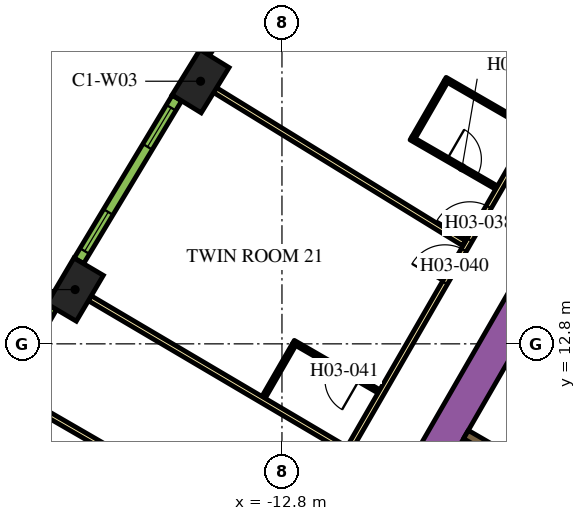
"""IFC4 building model, lengths in metres.
Left out: names, types, materials, properties, quantities, classifications, styles, units other than length and angle.
Written with IfcOpenShell. Run it as: python <this file> out.ifc"""

import sys

from ifc_helpers import new_model, si_unit, direction, frame, frame_2d, origin, origin_2d, place, context, subcontext, project, spatial, rectangle, extrude, element, fill, save


model = new_model("IFC4")
c1 = context("Model", 3, precision=1e-05, world=origin(), true_north=direction((0.0, 1.0)))
c2 = subcontext(c1, "Body", "Model", "MODEL_VIEW")
j1 = project(units=[si_unit("LENGTHUNIT", "METRE"), si_unit("PLANEANGLEUNIT", "RADIAN")], contexts=[c1])
p1 = place(None, origin())
s1 = spatial("IfcSite", under=j1, at=p1, CompositionType="ELEMENT")
p2 = place(p1, origin())
s2 = spatial("IfcBuilding", under=s1, at=p2, CompositionType="ELEMENT")
p3 = place(p2, frame((0.0, 0.0, 58.8)))
s3 = spatial("IfcBuildingStorey", under=s2, at=p3, CompositionType="ELEMENT", Elevation=58.8)
for number, where, z_axis, x_axis in (
    (1, (-14.942, 19.71, 0.0), (0.0, 0.0, 1.0), (-0.524, -0.852, 0.0)),
    (2, (-18.243, 14.228, 0.0), (0.0, 0.0, 1.0), (-0.508, -0.861, 0.0)),
):
    element("IfcColumn", number, at=place(p3, frame(where, z_axis=z_axis, x_axis=x_axis)), inside=s3, PredefinedType="COLUMN", context=c2, shape_type="SweptSolid", body=[
        extrude(rectangle(XDim=1.4, YDim=0.9, at=origin_2d()), origin(), (0.0, 0.0, 1.0), 3.9),
    ])
p4 = place(p3, frame((-14.268, 0.387, 0.0), z_axis=(0.0, 0.0, 1.0), x_axis=(0.499994617707, 0.866028511231, 0.0)))
e3 = element("IfcWall", 3, at=p4, inside=s3, PredefinedType="SOLIDWALL", context=c2, shape_type="SweptSolid", body=[
    extrude(rectangle(XDim=18.817, YDim=0.9, at=frame_2d((9.409, 0.0))), origin(), (0.0, 0.0, 1.0), 3.9),
])
p5 = place(p3, frame((-7.959, 10.415, 0.0), z_axis=(0.0, 0.0, 1.0), x_axis=(0.866020958405, -0.500007699544, 0.0)))
e4 = element("IfcWall", 4, at=p5, inside=s3, PredefinedType="SOLIDWALL", context=c2, shape_type="SweptSolid", body=[
    extrude(rectangle(XDim=4.1, YDim=0.25, at=frame_2d((2.05, 0.0))), origin(), (0.0, 0.0, 1.0), 3.9),
])
p6 = place(p3, frame((-19.081, -3.9, 0.0), z_axis=(0.0, 0.0, 1.0), x_axis=(0.499998313975, 0.866026377209, 0.0)))
e5 = element("IfcWall", 5, at=p6, inside=s3, PredefinedType="PARTITIONING", context=c2, shape_type="SweptSolid", body=[
    extrude(rectangle(XDim=25.766, YDim=0.15, at=frame_2d((12.883, 0.0))), origin(), (0.0, 0.0, 1.0), 2.75),
])
p7 = place(p6, frame((22.445, 0.0, 0.0)))
e6 = element("IfcOpeningElement", 6, at=p7, cuts=e5, PredefinedType="OPENING", context=c2, shape_type="SweptSolid", body=[
    extrude(rectangle(XDim=1.0, YDim=2.1, at=frame_2d((0.5, 1.05))), frame((0.0, 0.085, 0.0), z_axis=(0.0, -1.0, 0.0), x_axis=(1.0, 0.0, 0.0)), (0.0, 0.0, 1.0), 0.17),
])
p8 = place(p6, frame((21.138, 0.0, 0.0)))
e7 = element("IfcOpeningElement", 7, at=p8, cuts=e5, PredefinedType="OPENING", context=c2, shape_type="SweptSolid", body=[
    extrude(rectangle(XDim=1.0, YDim=2.1, at=frame_2d((0.5, 1.05))), frame((0.0, 0.085, 0.0), z_axis=(0.0, -1.0, 0.0), x_axis=(1.0, 0.0, 0.0)), (0.0, 0.0, 1.0), 0.17),
])
p9 = place(p6, frame((14.066, 0.0, 0.0)))
e8 = element("IfcOpeningElement", 8, at=p9, cuts=e5, PredefinedType="OPENING", context=c2, shape_type="SweptSolid", body=[
    extrude(rectangle(XDim=0.9, YDim=2.1, at=frame_2d((0.45, 1.05))), frame((0.0, 0.085, 0.0), z_axis=(0.0, -1.0, 0.0), x_axis=(1.0, 0.0, 0.0)), (0.0, 0.0, 1.0), 0.17),
])
p10 = place(p6, frame((11.693, 0.0, 0.0)))
e9 = element("IfcOpeningElement", 9, at=p10, cuts=e5, PredefinedType="OPENING", context=c2, shape_type="SweptSolid", body=[
    extrude(rectangle(XDim=1.0, YDim=2.1, at=frame_2d((0.5, 1.05))), frame((0.0, 0.085, 0.0), z_axis=(0.0, -1.0, 0.0), x_axis=(1.0, 0.0, 0.0)), (0.0, 0.0, 1.0), 0.17),
])
p11 = place(p3, frame((-19.982, 11.537, 0.0), z_axis=(0.0, 0.0, 1.0), x_axis=(0.866020994654, -0.500007636761, 0.0)))
e10 = element("IfcWall", 10, at=p11, inside=s3, PredefinedType="PARTITIONING", context=c2, shape_type="SweptSolid", body=[
    extrude(rectangle(XDim=8.423, YDim=0.15, at=frame_2d((4.211, 0.0))), origin(), (0.0, 0.0, 1.0), 2.75),
])
p12 = place(p3, frame((-17.856, 13.999, 0.0), z_axis=(0.0, 0.0, 1.0), x_axis=(0.861371519381, -0.507975497047, 0.0)))
e11 = element("IfcWall", 11, at=p12, inside=s3, PredefinedType="PARTITIONING", context=c2, shape_type="SweptSolid", body=[
    extrude(rectangle(XDim=7.804, YDim=0.15, at=frame_2d((3.902, 0.0))), origin(), (0.0, 0.0, 1.0), 2.75),
])
p13 = place(p3, frame((-14.558, 19.475, 0.0), z_axis=(0.0, 0.0, 1.0), x_axis=(0.851829455142, -0.523819223925, 0.0)))
e12 = element("IfcWall", 12, at=p13, inside=s3, PredefinedType="PARTITIONING", context=c2, shape_type="SweptSolid", body=[
    extrude(rectangle(XDim=7.688, YDim=0.15, at=frame_2d((3.844, 0.0))), origin(), (0.0, 0.0, 1.0), 2.75),
])
p14 = place(p3, frame((-11.16, 24.888, 0.0), z_axis=(0.0, 0.0, 1.0), x_axis=(0.84199813156, -0.539480441211, 0.0)))
e13 = element("IfcWall", 13, at=p14, inside=s3, PredefinedType="PARTITIONING", context=c2, shape_type="SweptSolid", body=[
    extrude(rectangle(XDim=11.638, YDim=0.15, at=frame_2d((5.819, 0.0))), origin(), (0.0, 0.0, 1.0), 2.75),
])
p15 = place(p3, frame((-9.405, 18.21, 0.0), z_axis=(0.0, 0.0, 1.0), x_axis=(0.865997922154, -0.500047596559, 0.0)))
e14 = element("IfcWall", 14, at=p15, inside=s3, PredefinedType="PARTITIONING", context=c2, shape_type="SweptSolid", body=[
    extrude(rectangle(XDim=2.6, YDim=0.1, at=frame_2d((1.3, 0.0))), origin(), (0.0, 0.0, 1.0), 2.75),
])
p16 = place(p15, frame((1.1, 0.0, 0.0)))
e15 = element("IfcOpeningElement", 15, at=p16, cuts=e14, PredefinedType="OPENING", context=c2, shape_type="SweptSolid", body=[
    extrude(rectangle(XDim=0.9, YDim=2.1, at=frame_2d((0.45, 1.05))), frame((0.0, 0.06, 0.0), z_axis=(0.0, -1.0, 0.0), x_axis=(1.0, 0.0, 0.0)), (0.0, 0.0, 1.0), 0.12),
])
p17 = place(p3, frame((-9.336, 18.229, 0.0), z_axis=(0.0, 0.0, 1.0), x_axis=(0.499954529098, 0.86605165483, 0.0)))
e16 = element("IfcWall", 16, at=p17, inside=s3, PredefinedType="PARTITIONING", context=c2, shape_type="SweptSolid", body=[
    extrude(rectangle(XDim=1.7, YDim=0.1, at=frame_2d((0.85, 0.0))), origin(), (0.0, 0.0, 1.0), 2.75),
])
p18 = place(p3, frame((-6.253, 18.469, 0.0), z_axis=(0.0, 0.0, 1.0), x_axis=(-0.866021400173, 0.500006934395, 0.0)))
e17 = element("IfcWall", 17, at=p18, inside=s3, PredefinedType="PARTITIONING", context=c2, shape_type="SweptSolid", body=[
    extrude(rectangle(XDim=2.6, YDim=0.1, at=frame_2d((1.3, 0.0))), origin(), (0.0, 0.0, 1.0), 2.75),
])
p19 = place(p3, frame((-10.249, 11.549, 0.0), z_axis=(0.0, 0.0, 1.0), x_axis=(-0.866021400173, 0.500006934395, 0.0)))
e18 = element("IfcWall", 18, at=p19, inside=s3, PredefinedType="PARTITIONING", context=c2, shape_type="SweptSolid", body=[
    extrude(rectangle(XDim=2.6, YDim=0.1, at=frame_2d((1.3, 0.0))), origin(), (0.0, 0.0, 1.0), 2.75),
])
p20 = place(p19, frame((0.6, 0.0, 0.0)))
e19 = element("IfcOpeningElement", 19, at=p20, cuts=e18, PredefinedType="OPENING", context=c2, shape_type="SweptSolid", body=[
    extrude(rectangle(XDim=0.9, YDim=2.1, at=frame_2d((0.45, 1.05))), frame((0.0, 0.06, 0.0), z_axis=(0.0, -1.0, 0.0), x_axis=(1.0, 0.0, 0.0)), (0.0, 0.0, 1.0), 0.12),
])
p21 = place(p3, frame((-12.487, 12.772, 0.0), z_axis=(0.0, 0.0, 1.0), x_axis=(-0.500085729368, -0.865975902253, 0.0)))
e20 = element("IfcWall", 20, at=p21, inside=s3, PredefinedType="PARTITIONING", context=c2, shape_type="SweptSolid", body=[
    extrude(rectangle(XDim=1.59, YDim=0.1, at=frame_2d((0.795, 0.0))), origin(), (0.0, 0.0, 1.0), 2.75),
])
p22 = place(p3, frame((-12.17, 24.699, 0.0), z_axis=(0.0, 0.0, 1.0), x_axis=(-0.531688286542, -0.846940119462, 0.0)))
e21 = element("IfcWall", 21, at=p22, inside=s3, PredefinedType="SOLIDWALL", context=c2, shape_type="SweptSolid", body=[
    extrude(rectangle(XDim=4.998, YDim=0.29, at=frame_2d((2.499, 0.0))), origin(), (0.0, 0.0, 1.0), 3.65),
])
p23 = place(p22, frame((0.297, 0.0, 0.9)))
e22 = element("IfcOpeningElement", 22, at=p23, cuts=e21, PredefinedType="OPENING", context=c2, shape_type="SweptSolid", body=[
    extrude(rectangle(XDim=1.2, YDim=2.15, at=frame_2d((0.6, 1.075))), frame((0.0, 0.155, 0.0), z_axis=(0.0, -1.0, 0.0), x_axis=(1.0, 0.0, 0.0)), (0.0, 0.0, 1.0), 0.31),
])
p24 = place(p22, frame((3.501, 0.0, 0.9)))
e23 = element("IfcOpeningElement", 23, at=p24, cuts=e21, PredefinedType="OPENING", context=c2, shape_type="SweptSolid", body=[
    extrude(rectangle(XDim=1.2, YDim=2.15, at=frame_2d((0.6, 1.075))), frame((0.0, 0.155, 0.0), z_axis=(0.0, -1.0, 0.0), x_axis=(1.0, 0.0, 0.0)), (0.0, 0.0, 1.0), 0.31),
])
p25 = place(p3, frame((-15.564, 19.267, 0.0), z_axis=(0.0, 0.0, 1.0), x_axis=(-0.515938796285, -0.856625448191, 0.0)))
e24 = element("IfcWall", 24, at=p25, inside=s3, PredefinedType="SOLIDWALL", context=c2, shape_type="SweptSolid", body=[
    extrude(rectangle(XDim=4.998, YDim=0.29, at=frame_2d((2.499, 0.0))), origin(), (0.0, 0.0, 1.0), 3.65),
])
p26 = place(p25, frame((0.297, 0.0, 0.9)))
e25 = element("IfcOpeningElement", 25, at=p26, cuts=e24, PredefinedType="OPENING", context=c2, shape_type="SweptSolid", body=[
    extrude(rectangle(XDim=1.2, YDim=2.15, at=frame_2d((0.6, 1.075))), frame((0.0, 0.155, 0.0), z_axis=(0.0, -1.0, 0.0), x_axis=(1.0, 0.0, 0.0)), (0.0, 0.0, 1.0), 0.31),
])
p27 = place(p25, frame((3.501, 0.0, 0.9)))
e26 = element("IfcOpeningElement", 26, at=p27, cuts=e24, PredefinedType="OPENING", context=c2, shape_type="SweptSolid", body=[
    extrude(rectangle(XDim=1.2, YDim=2.15, at=frame_2d((0.6, 1.075))), frame((0.0, 0.155, 0.0), z_axis=(0.0, -1.0, 0.0), x_axis=(1.0, 0.0, 0.0)), (0.0, 0.0, 1.0), 0.31),
])
p28 = place(p3, frame((-18.858, 13.773, 0.0), z_axis=(0.0, 0.0, 1.0), x_axis=(-0.50002123722, -0.866013142123, 0.0)))
e27 = element("IfcWall", 27, at=p28, inside=s3, PredefinedType="SOLIDWALL", context=c2, shape_type="SweptSolid", body=[
    extrude(rectangle(XDim=4.998, YDim=0.29, at=frame_2d((2.499, 0.0))), origin(), (0.0, 0.0, 1.0), 3.65),
])
p29 = place(p28, frame((0.297, 0.0, 0.9)))
e28 = element("IfcOpeningElement", 28, at=p29, cuts=e27, PredefinedType="OPENING", context=c2, shape_type="SweptSolid", body=[
    extrude(rectangle(XDim=1.2, YDim=2.15, at=frame_2d((0.6, 1.075))), frame((0.0, 0.155, 0.0), z_axis=(0.0, -1.0, 0.0), x_axis=(1.0, 0.0, 0.0)), (0.0, 0.0, 1.0), 0.31),
])
p30 = place(p28, frame((3.501, 0.0, 0.9)))
e29 = element("IfcOpeningElement", 29, at=p30, cuts=e27, PredefinedType="OPENING", context=c2, shape_type="SweptSolid", body=[
    extrude(rectangle(XDim=1.2, YDim=2.15, at=frame_2d((0.6, 1.075))), frame((0.0, 0.155, 0.0), z_axis=(0.0, -1.0, 0.0), x_axis=(1.0, 0.0, 0.0)), (0.0, 0.0, 1.0), 0.31),
])
p31 = place(p7, origin())
e30 = element("IfcDoor", 30, at=p31, inside=s3, OperationType="SINGLE_SWING_LEFT", PredefinedType="DOOR", context=c2, shape_type="SweptSolid", body=[
    extrude(rectangle(XDim=1.0, YDim=2.1, at=frame_2d((0.5, 1.05))), frame((0.0, 0.025, 0.0), z_axis=(0.0, -1.0, 0.0), x_axis=(1.0, 0.0, 0.0)), (0.0, 0.0, 1.0), 0.05),
])
fill(e6, e30)
p32 = place(p16, origin())
e31 = element("IfcDoor", 31, at=p32, inside=s3, OperationType="SINGLE_SWING_LEFT", PredefinedType="DOOR", context=c2, shape_type="SweptSolid", body=[
    extrude(rectangle(XDim=0.9, YDim=2.1, at=frame_2d((0.45, 1.05))), frame((0.0, 0.025, 0.0), z_axis=(0.0, -1.0, 0.0), x_axis=(1.0, 0.0, 0.0)), (0.0, 0.0, 1.0), 0.05),
])
fill(e15, e31)
p33 = place(p8, origin())
e32 = element("IfcDoor", 32, at=p33, inside=s3, OperationType="SINGLE_SWING_RIGHT", PredefinedType="DOOR", context=c2, shape_type="SweptSolid", body=[
    extrude(rectangle(XDim=1.0, YDim=2.1, at=frame_2d((0.5, 1.05))), frame((0.0, 0.025, 0.0), z_axis=(0.0, -1.0, 0.0), x_axis=(1.0, 0.0, 0.0)), (0.0, 0.0, 1.0), 0.05),
])
fill(e7, e32)
p34 = place(p20, origin())
e33 = element("IfcDoor", 33, at=p34, inside=s3, OperationType="SINGLE_SWING_RIGHT", PredefinedType="DOOR", context=c2, shape_type="SweptSolid", body=[
    extrude(rectangle(XDim=0.9, YDim=2.1, at=frame_2d((0.45, 1.05))), frame((0.0, 0.025, 0.0), z_axis=(0.0, -1.0, 0.0), x_axis=(1.0, 0.0, 0.0)), (0.0, 0.0, 1.0), 0.05),
])
fill(e19, e33)
p35 = place(p26, origin())
e34 = element("IfcWindow", 34, at=p35, inside=s3, PartitioningType="DOUBLE_PANEL_VERTICAL", PredefinedType="WINDOW", context=c2, shape_type="SweptSolid", body=[
    extrude(rectangle(XDim=1.2, YDim=2.15, at=frame_2d((0.6, 1.075))), frame((0.0, 0.015, 0.0), z_axis=(0.0, -1.0, 0.0), x_axis=(1.0, 0.0, 0.0)), (0.0, 0.0, 1.0), 0.06),
])
fill(e25, e34)
p36 = place(p27, origin())
e35 = element("IfcWindow", 35, at=p36, inside=s3, PartitioningType="DOUBLE_PANEL_VERTICAL", PredefinedType="WINDOW", context=c2, shape_type="SweptSolid", body=[
    extrude(rectangle(XDim=1.2, YDim=2.15, at=frame_2d((0.6, 1.075))), frame((0.0, 0.015, 0.0), z_axis=(0.0, -1.0, 0.0), x_axis=(1.0, 0.0, 0.0)), (0.0, 0.0, 1.0), 0.06),
])
fill(e26, e35)
save(model, sys.argv[1])
